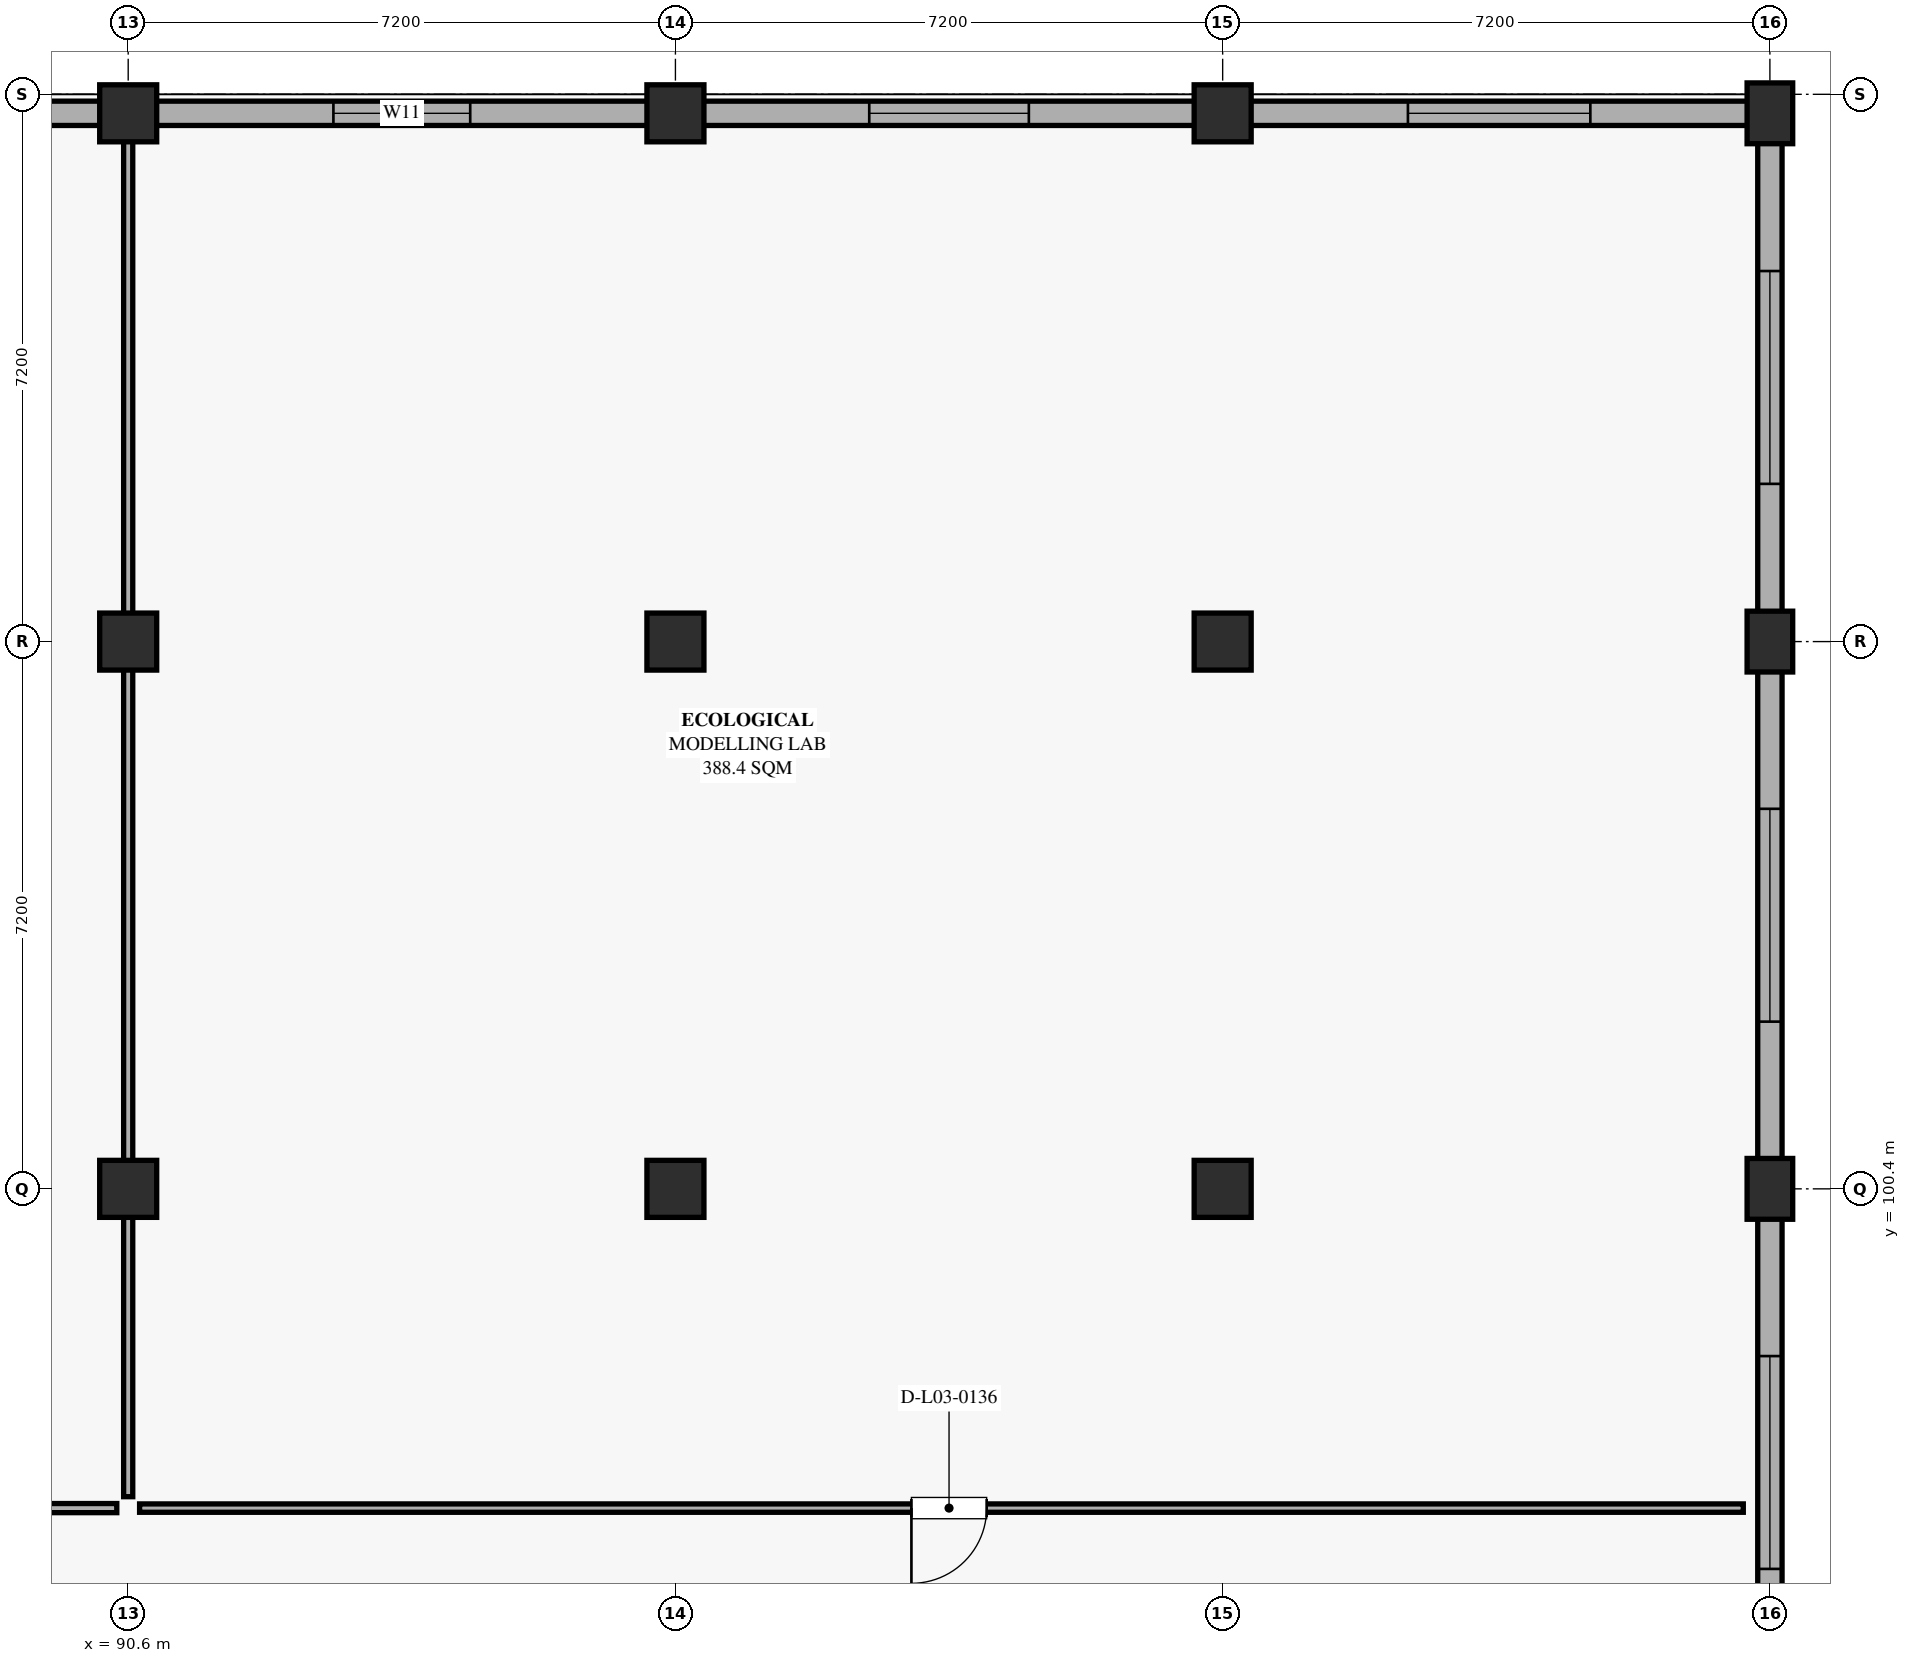
"""IFC4 building model, lengths in metres.
Left out: names, types, materials, properties, quantities, classifications, styles, units other than length and angle.
Written with IfcOpenShell. Run it as: python <this file> out.ifc"""

import sys

from ifc_helpers import new_model, si_unit, direction, frame, frame_2d, origin, origin_2d, place, context, subcontext, project, spatial, rectangle, extrude, element, fill, save


model = new_model("IFC4")
c1 = context("Model", 3, precision=1e-05, world=origin(), true_north=direction((0.0, 1.0)))
c2 = subcontext(c1, "Body", "Model", "MODEL_VIEW")
j1 = project(units=[si_unit("LENGTHUNIT", "METRE"), si_unit("PLANEANGLEUNIT", "RADIAN")], contexts=[c1])
p1 = place(None, origin())
s1 = spatial("IfcSite", under=j1, at=p1, CompositionType="ELEMENT")
p2 = place(p1, origin())
s2 = spatial("IfcBuilding", under=s1, at=p2, CompositionType="ELEMENT")
p3 = place(p2, frame((0.0, 0.0, 15.12)))
s3 = spatial("IfcBuildingStorey", under=s2, at=p3, CompositionType="ELEMENT", Elevation=15.12)
for number, where, z_axis, x_axis in (
    (1, (90.6, 100.4, 0.0), (0.0, 0.0, 1.0), (1.0, 0.0, 0.0)),
    (2, (97.8, 100.4, 0.0), (0.0, 0.0, 1.0), (1.0, 0.0, 0.0)),
    (3, (105.0, 100.4, 0.0), (0.0, 0.0, 1.0), (1.0, 0.0, 0.0)),
):
    element("IfcColumn", number, at=place(p3, frame(where, z_axis=z_axis, x_axis=x_axis)), inside=s3, PredefinedType="COLUMN", context=c2, shape_type="SweptSolid", body=[
        extrude(rectangle(XDim=0.75, YDim=0.75, at=origin_2d()), origin(), (0.0, 0.0, 1.0), 4.68),
    ])
p4 = place(p3, frame((112.2, 100.4, 0.0), z_axis=(0.0, 0.0, 1.0), x_axis=(1.0, 0.0, 0.0)))
e4 = element("IfcColumn", 4, at=p4, inside=s3, PredefinedType="COLUMN", context=c2, shape_type="SweptSolid", body=[
    extrude(rectangle(XDim=0.6, YDim=0.8, at=origin_2d()), origin(), (0.0, 0.0, 1.0), 4.68),
])
for number, where, z_axis, x_axis in (
    (5, (90.6, 107.6, 0.0), (0.0, 0.0, 1.0), (1.0, 0.0, 0.0)),
    (6, (97.8, 107.6, 0.0), (0.0, 0.0, 1.0), (1.0, 0.0, 0.0)),
    (7, (105.0, 107.6, 0.0), (0.0, 0.0, 1.0), (1.0, 0.0, 0.0)),
):
    element("IfcColumn", number, at=place(p3, frame(where, z_axis=z_axis, x_axis=x_axis)), inside=s3, PredefinedType="COLUMN", context=c2, shape_type="SweptSolid", body=[
        extrude(rectangle(XDim=0.75, YDim=0.75, at=origin_2d()), origin(), (0.0, 0.0, 1.0), 4.68),
    ])
p5 = place(p3, frame((112.2, 107.6, 0.0), z_axis=(0.0, 0.0, 1.0), x_axis=(1.0, 0.0, 0.0)))
e8 = element("IfcColumn", 8, at=p5, inside=s3, PredefinedType="COLUMN", context=c2, shape_type="SweptSolid", body=[
    extrude(rectangle(XDim=0.6, YDim=0.8, at=origin_2d()), origin(), (0.0, 0.0, 1.0), 4.68),
])
for number, where, z_axis, x_axis in (
    (9, (90.6, 114.55, 0.0), (0.0, 0.0, 1.0), (1.0, 0.0, 0.0)),
    (10, (97.8, 114.55, 0.0), (0.0, 0.0, 1.0), (1.0, 0.0, 0.0)),
    (11, (105.0, 114.55, 0.0), (0.0, 0.0, 1.0), (1.0, 0.0, 0.0)),
):
    element("IfcColumn", number, at=place(p3, frame(where, z_axis=z_axis, x_axis=x_axis)), inside=s3, PredefinedType="COLUMN", context=c2, shape_type="SweptSolid", body=[
        extrude(rectangle(XDim=0.75, YDim=0.75, at=origin_2d()), origin(), (0.0, 0.0, 1.0), 4.68),
    ])
p6 = place(p3, frame((112.2, 114.55, 0.0), z_axis=(0.0, 0.0, 1.0), x_axis=(1.0, 0.0, 0.0)))
e12 = element("IfcColumn", 12, at=p6, inside=s3, PredefinedType="COLUMN", context=c2, shape_type="SweptSolid", body=[
    extrude(rectangle(XDim=0.6, YDim=0.8, at=origin_2d()), origin(), (0.0, 0.0, 1.0), 4.68),
])
p7 = place(p3, frame((112.2, 100.015, 0.0), z_axis=(0.0, 0.0, 1.0), x_axis=(0.0, -1.0, 0.0)))
e13 = element("IfcWall", 13, at=p7, inside=s3, PredefinedType="SOLIDWALL", context=c2, shape_type="SweptSolid", body=[
    extrude(rectangle(XDim=6.43, YDim=0.32, at=frame_2d((3.215, 0.0))), origin(), (0.0, 0.0, 1.0), 3.18),
])
p8 = place(p7, frame((1.815, 0.0, 0.85)))
e14 = element("IfcOpeningElement", 14, at=p8, cuts=e13, PredefinedType="OPENING", context=c2, shape_type="SweptSolid", body=[
    extrude(rectangle(XDim=2.8, YDim=2.2, at=frame_2d((1.4, 1.1))), frame((0.0, 0.17, 0.0), z_axis=(0.0, -1.0, 0.0), x_axis=(1.0, 0.0, 0.0)), (0.0, 0.0, 1.0), 0.34),
])
p9 = place(p3, frame((112.2, 107.215, 0.0), z_axis=(0.0, 0.0, 1.0), x_axis=(0.0, -1.0, 0.0)))
e15 = element("IfcWall", 15, at=p9, inside=s3, PredefinedType="SOLIDWALL", context=c2, shape_type="SweptSolid", body=[
    extrude(rectangle(XDim=6.43, YDim=0.32, at=frame_2d((3.215, 0.0))), origin(), (0.0, 0.0, 1.0), 3.18),
])
p10 = place(p9, frame((1.815, 0.0, 0.85)))
e16 = element("IfcOpeningElement", 16, at=p10, cuts=e15, PredefinedType="OPENING", context=c2, shape_type="SweptSolid", body=[
    extrude(rectangle(XDim=2.8, YDim=2.2, at=frame_2d((1.4, 1.1))), frame((0.0, 0.17, 0.0), z_axis=(0.0, -1.0, 0.0), x_axis=(1.0, 0.0, 0.0)), (0.0, 0.0, 1.0), 0.34),
])
p11 = place(p3, frame((112.2, 114.165, 0.0), z_axis=(0.0, 0.0, 1.0), x_axis=(0.0, -1.0, 0.0)))
e17 = element("IfcWall", 17, at=p11, inside=s3, PredefinedType="SOLIDWALL", context=c2, shape_type="SweptSolid", body=[
    extrude(rectangle(XDim=6.18, YDim=0.32, at=frame_2d((3.09, 0.0))), origin(), (0.0, 0.0, 1.0), 3.18),
])
p12 = place(p11, frame((1.69, 0.0, 0.85)))
e18 = element("IfcOpeningElement", 18, at=p12, cuts=e17, PredefinedType="OPENING", context=c2, shape_type="SweptSolid", body=[
    extrude(rectangle(XDim=2.8, YDim=2.2, at=frame_2d((1.4, 1.1))), frame((0.0, 0.17, 0.0), z_axis=(0.0, -1.0, 0.0), x_axis=(1.0, 0.0, 0.0)), (0.0, 0.0, 1.0), 0.34),
])
p13 = place(p3, frame((83.76, 114.55, 0.0), z_axis=(0.0, 0.0, 1.0), x_axis=(1.0, 0.0, 0.0)))
e19 = element("IfcWall", 19, at=p13, inside=s3, PredefinedType="SOLIDWALL", context=c2, shape_type="SweptSolid", body=[
    extrude(rectangle(XDim=6.48, YDim=0.32, at=frame_2d((3.24, 0.0))), origin(), (0.0, 0.0, 1.0), 3.18),
])
p14 = place(p13, frame((2.64, 0.0, 0.85)))
e20 = element("IfcOpeningElement", 20, at=p14, cuts=e19, PredefinedType="OPENING", context=c2, shape_type="SweptSolid", body=[
    extrude(rectangle(XDim=1.2, YDim=2.1, at=frame_2d((0.6, 1.05))), frame((0.0, 0.17, 0.0), z_axis=(0.0, -1.0, 0.0), x_axis=(1.0, 0.0, 0.0)), (0.0, 0.0, 1.0), 0.34),
])
p15 = place(p3, frame((90.96, 114.55, 0.0), z_axis=(0.0, 0.0, 1.0), x_axis=(1.0, 0.0, 0.0)))
e21 = element("IfcWall", 21, at=p15, inside=s3, PredefinedType="SOLIDWALL", context=c2, shape_type="SweptSolid", body=[
    extrude(rectangle(XDim=6.48, YDim=0.32, at=frame_2d((3.24, 0.0))), origin(), (0.0, 0.0, 1.0), 3.18),
])
p16 = place(p15, frame((2.34, 0.0, 0.85)))
e22 = element("IfcOpeningElement", 22, at=p16, cuts=e21, PredefinedType="OPENING", context=c2, shape_type="SweptSolid", body=[
    extrude(rectangle(XDim=1.8, YDim=1.8, at=frame_2d((0.9, 0.9))), frame((0.0, 0.17, 0.0), z_axis=(0.0, -1.0, 0.0), x_axis=(1.0, 0.0, 0.0)), (0.0, 0.0, 1.0), 0.34),
])
p17 = place(p3, frame((98.16, 114.55, 0.0), z_axis=(0.0, 0.0, 1.0), x_axis=(1.0, 0.0, 0.0)))
e23 = element("IfcWall", 23, at=p17, inside=s3, PredefinedType="SOLIDWALL", context=c2, shape_type="SweptSolid", body=[
    extrude(rectangle(XDim=6.48, YDim=0.32, at=frame_2d((3.24, 0.0))), origin(), (0.0, 0.0, 1.0), 3.18),
])
p18 = place(p17, frame((2.19, 0.0, 0.85)))
e24 = element("IfcOpeningElement", 24, at=p18, cuts=e23, PredefinedType="OPENING", context=c2, shape_type="SweptSolid", body=[
    extrude(rectangle(XDim=2.1, YDim=1.8, at=frame_2d((1.05, 0.9))), frame((0.0, 0.17, 0.0), z_axis=(0.0, -1.0, 0.0), x_axis=(1.0, 0.0, 0.0)), (0.0, 0.0, 1.0), 0.34),
])
p19 = place(p3, frame((105.36, 114.55, 0.0), z_axis=(0.0, 0.0, 1.0), x_axis=(1.0, 0.0, 0.0)))
e25 = element("IfcWall", 25, at=p19, inside=s3, PredefinedType="SOLIDWALL", context=c2, shape_type="SweptSolid", body=[
    extrude(rectangle(XDim=6.555, YDim=0.32, at=frame_2d((3.277, 0.0))), origin(), (0.0, 0.0, 1.0), 3.18),
])
p20 = place(p19, frame((2.077, 0.0, 0.85)))
e26 = element("IfcOpeningElement", 26, at=p20, cuts=e25, PredefinedType="OPENING", context=c2, shape_type="SweptSolid", body=[
    extrude(rectangle(XDim=2.4, YDim=1.8, at=frame_2d((1.2, 0.9))), frame((0.0, 0.17, 0.0), z_axis=(0.0, -1.0, 0.0), x_axis=(1.0, 0.0, 0.0)), (0.0, 0.0, 1.0), 0.34),
])
p21 = place(p3, frame((90.45, 96.2, 0.0), z_axis=(0.0, 0.0, 1.0), x_axis=(-1.0, 0.0, 0.0)))
e27 = element("IfcWall", 27, at=p21, inside=s3, PredefinedType="PARTITIONING", context=c2, shape_type="SweptSolid", body=[
    extrude(rectangle(XDim=28.3, YDim=0.12, at=frame_2d((14.15, 0.0))), origin(), (0.0, 0.0, 1.0), 3.16),
])
p22 = place(p21, frame((17.355, 0.0, 0.0)))
e28 = element("IfcOpeningElement", 28, at=p22, cuts=e27, PredefinedType="OPENING", context=c2, shape_type="SweptSolid", body=[
    extrude(rectangle(XDim=0.99, YDim=2.05, at=frame_2d((0.495, 1.025))), frame((0.0, 0.07, 0.0), z_axis=(0.0, -1.0, 0.0), x_axis=(1.0, 0.0, 0.0)), (0.0, 0.0, 1.0), 0.14),
])
p23 = place(p3, frame((90.6, 114.2, 0.0), z_axis=(0.0, 0.0, 1.0), x_axis=(0.0, -1.0, 0.0)))
e29 = element("IfcWall", 29, at=p23, inside=s3, PredefinedType="PARTITIONING", context=c2, shape_type="SweptSolid", body=[
    extrude(rectangle(XDim=17.85, YDim=0.12, at=frame_2d((8.925, 0.0))), origin(), (0.0, 0.0, 1.0), 3.16),
])
p24 = place(p3, frame((111.85, 96.2, 0.0), z_axis=(0.0, 0.0, 1.0), x_axis=(-1.0, 0.0, 0.0)))
e30 = element("IfcWall", 30, at=p24, inside=s3, PredefinedType="PARTITIONING", context=c2, shape_type="SweptSolid", body=[
    extrude(rectangle(XDim=21.1, YDim=0.11, at=frame_2d((10.55, 0.0))), origin(), (0.0, 0.0, 1.0), 3.16),
])
p25 = place(p24, frame((9.955, 0.0, 0.0)))
e31 = element("IfcOpeningElement", 31, at=p25, cuts=e30, PredefinedType="OPENING", context=c2, shape_type="SweptSolid", body=[
    extrude(rectangle(XDim=0.99, YDim=2.1, at=frame_2d((0.495, 1.05))), frame((0.0, 0.065, 0.0), z_axis=(0.0, -1.0, 0.0), x_axis=(1.0, 0.0, 0.0)), (0.0, 0.0, 1.0), 0.13),
])
p26 = place(p8, origin())
e32 = element("IfcWindow", 32, at=p26, inside=s3, PartitioningType="DOUBLE_PANEL_VERTICAL", PredefinedType="WINDOW", context=c2, shape_type="SweptSolid", body=[
    extrude(rectangle(XDim=2.8, YDim=2.2, at=frame_2d((1.4, 1.1))), frame((0.0, 0.03, 0.0), z_axis=(0.0, -1.0, 0.0), x_axis=(1.0, 0.0, 0.0)), (0.0, 0.0, 1.0), 0.06),
])
fill(e14, e32)
p27 = place(p10, origin())
e33 = element("IfcWindow", 33, at=p27, inside=s3, PartitioningType="DOUBLE_PANEL_VERTICAL", PredefinedType="WINDOW", context=c2, shape_type="SweptSolid", body=[
    extrude(rectangle(XDim=2.8, YDim=2.2, at=frame_2d((1.4, 1.1))), frame((0.0, 0.03, 0.0), z_axis=(0.0, -1.0, 0.0), x_axis=(1.0, 0.0, 0.0)), (0.0, 0.0, 1.0), 0.06),
])
fill(e16, e33)
p28 = place(p12, origin())
e34 = element("IfcWindow", 34, at=p28, inside=s3, PartitioningType="DOUBLE_PANEL_VERTICAL", PredefinedType="WINDOW", context=c2, shape_type="SweptSolid", body=[
    extrude(rectangle(XDim=2.8, YDim=2.2, at=frame_2d((1.4, 1.1))), frame((0.0, 0.03, 0.0), z_axis=(0.0, -1.0, 0.0), x_axis=(1.0, 0.0, 0.0)), (0.0, 0.0, 1.0), 0.06),
])
fill(e18, e34)
p29 = place(p16, origin())
e35 = element("IfcWindow", 35, at=p29, inside=s3, PartitioningType="DOUBLE_PANEL_VERTICAL", PredefinedType="WINDOW", context=c2, shape_type="SweptSolid", body=[
    extrude(rectangle(XDim=1.8, YDim=1.8, at=frame_2d((0.9, 0.9))), frame((0.0, 0.03, 0.0), z_axis=(0.0, -1.0, 0.0), x_axis=(1.0, 0.0, 0.0)), (0.0, 0.0, 1.0), 0.06),
])
fill(e22, e35)
p30 = place(p18, origin())
e36 = element("IfcWindow", 36, at=p30, inside=s3, PartitioningType="DOUBLE_PANEL_VERTICAL", PredefinedType="WINDOW", context=c2, shape_type="SweptSolid", body=[
    extrude(rectangle(XDim=2.1, YDim=1.8, at=frame_2d((1.05, 0.9))), frame((0.0, 0.03, 0.0), z_axis=(0.0, -1.0, 0.0), x_axis=(1.0, 0.0, 0.0)), (0.0, 0.0, 1.0), 0.06),
])
fill(e24, e36)
p31 = place(p20, origin())
e37 = element("IfcWindow", 37, at=p31, inside=s3, PartitioningType="DOUBLE_PANEL_VERTICAL", PredefinedType="WINDOW", context=c2, shape_type="SweptSolid", body=[
    extrude(rectangle(XDim=2.4, YDim=1.8, at=frame_2d((1.2, 0.9))), frame((0.0, 0.03, 0.0), z_axis=(0.0, -1.0, 0.0), x_axis=(1.0, 0.0, 0.0)), (0.0, 0.0, 1.0), 0.06),
])
fill(e26, e37)
p32 = place(p25, origin())
e38 = element("IfcDoor", 38, at=p32, inside=s3, OperationType="SINGLE_SWING_RIGHT", PredefinedType="DOOR", context=c2, shape_type="SweptSolid", body=[
    extrude(rectangle(XDim=0.99, YDim=2.1, at=frame_2d((0.495, 1.05))), frame((0.0, 0.025, 0.0), z_axis=(0.0, -1.0, 0.0), x_axis=(1.0, 0.0, 0.0)), (0.0, 0.0, 1.0), 0.05),
])
fill(e31, e38)
save(model, sys.argv[1])
